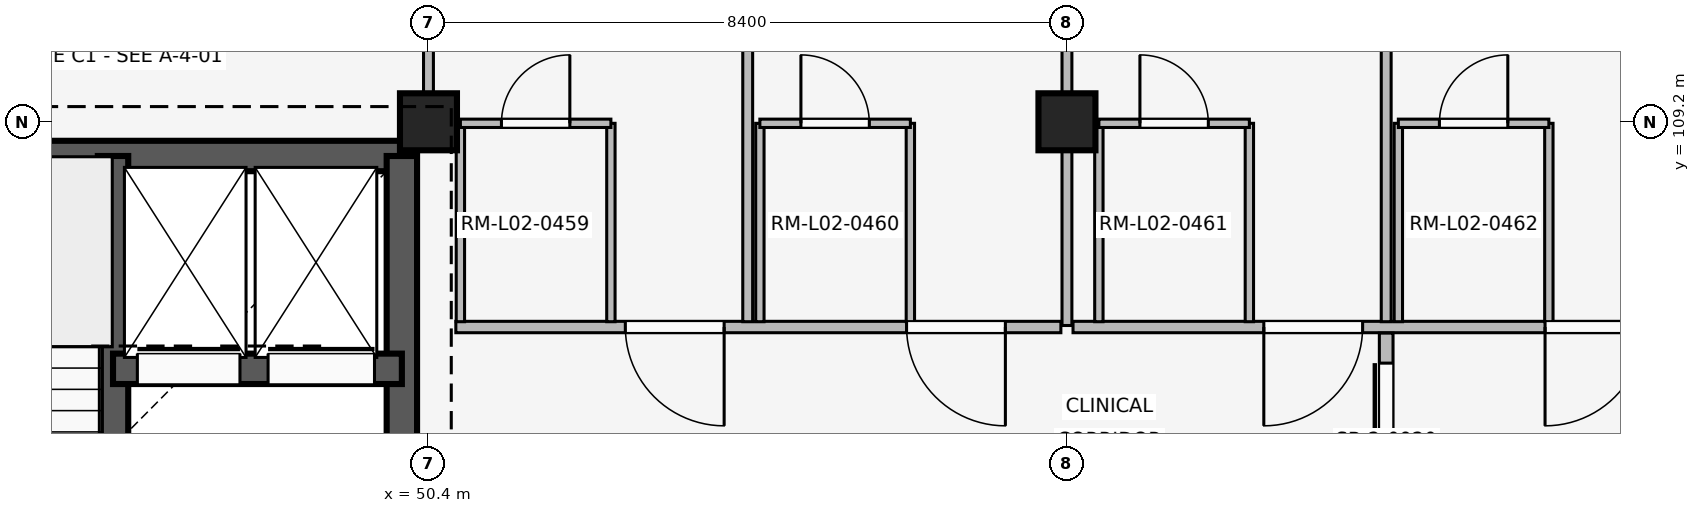
"""IFC4 building model, lengths in metres.
Left out: names, types, materials, properties, quantities, classifications, styles, units other than length and angle.
Written with IfcOpenShell. Run it as: python <this file> out.ifc"""

import sys

from ifc_helpers import new_model, si_unit, direction, frame, frame_2d, origin, origin_2d, place, context, subcontext, project, spatial, rectangle, extrude, element, fill, save


model = new_model("IFC4")
c1 = context("Model", 3, precision=1e-05, world=origin(), true_north=direction((0.0, 1.0)))
c2 = subcontext(c1, "Body", "Model", "MODEL_VIEW")
j1 = project(units=[si_unit("LENGTHUNIT", "METRE"), si_unit("PLANEANGLEUNIT", "RADIAN")], contexts=[c1])
p1 = place(None, origin())
s1 = spatial("IfcSite", under=j1, at=p1, CompositionType="ELEMENT")
p2 = place(p1, origin())
s2 = spatial("IfcBuilding", under=s1, at=p2, CompositionType="ELEMENT")
p3 = place(p2, frame((0.0, 0.0, 8.1)))
s3 = spatial("IfcBuildingStorey", under=s2, at=p3, CompositionType="ELEMENT", Elevation=8.1)
for number, where, z_axis, x_axis in (
    (1, (50.4, 109.2, 0.0), (0.0, 0.0, 1.0), (1.0, 0.0, 0.0)),
    (2, (58.8, 109.2, 0.0), (0.0, 0.0, 1.0), (1.0, 0.0, 0.0)),
):
    element("IfcColumn", number, at=place(p3, frame(where, z_axis=z_axis, x_axis=x_axis)), inside=s3, PredefinedType="COLUMN", context=c2, shape_type="SweptSolid", body=[
        extrude(rectangle(XDim=0.75, YDim=0.75, at=origin_2d()), origin(), (0.0, 0.0, 1.0), 4.8),
    ])
p4 = place(p3, frame((42.55, 108.75, 0.0), z_axis=(0.0, 0.0, 1.0), x_axis=(1.0, 0.0, 0.0)))
e3 = element("IfcWall", 3, at=p4, inside=s3, PredefinedType="SHEAR", context=c2, shape_type="SweptSolid", body=[
    extrude(rectangle(XDim=7.5, YDim=0.4, at=frame_2d((3.75, 0.0))), origin(), (0.0, 0.0, 1.0), 4.52),
])
p5 = place(p3, frame((50.05, 101.2, 0.0), z_axis=(0.0, 0.0, 1.0), x_axis=(0.0, 1.0, 0.0)))
e4 = element("IfcWall", 4, at=p5, inside=s3, PredefinedType="SHEAR", context=c2, shape_type="SweptSolid", body=[
    extrude(rectangle(XDim=7.55, YDim=0.4, at=frame_2d((3.775, 0.0))), origin(), (0.0, 0.0, 1.0), 4.52),
])
p6 = place(p5, frame((2.4, 0.0, 0.0)))
e5 = element("IfcOpeningElement", 5, at=p6, cuts=e4, PredefinedType="OPENING", context=c2, shape_type="SweptSolid", body=[
    extrude(rectangle(XDim=1.2, YDim=2.2, at=frame_2d((0.6, 1.1))), frame((0.0, 0.21, 0.0), z_axis=(0.0, -1.0, 0.0), x_axis=(1.0, 0.0, 0.0)), (0.0, 0.0, 1.0), 0.42),
])
p7 = place(p3, frame((46.25, 101.2, 0.0), z_axis=(0.0, 0.0, 1.0), x_axis=(0.0, 1.0, 0.0)))
e6 = element("IfcWall", 6, at=p7, inside=s3, PredefinedType="SHEAR", context=c2, shape_type="SweptSolid", body=[
    extrude(rectangle(XDim=7.55, YDim=0.4, at=frame_2d((3.775, 0.0))), origin(), (0.0, 0.0, 1.0), 4.52),
])
p8 = place(p7, frame((0.28, 0.0, 0.0)))
e7 = element("IfcOpeningElement", 7, at=p8, cuts=e6, PredefinedType="OPENING", context=c2, shape_type="SweptSolid", body=[
    extrude(rectangle(XDim=1.0, YDim=2.15, at=frame_2d((0.5, 1.075))), frame((0.0, 0.21, 0.0), z_axis=(0.0, -1.0, 0.0), x_axis=(1.0, 0.0, 0.0)), (0.0, 0.0, 1.0), 0.42),
])
p9 = place(p3, frame((46.25, 105.95, 0.0), z_axis=(0.0, 0.0, 1.0), x_axis=(1.0, 0.0, 0.0)))
e8 = element("IfcWall", 8, at=p9, inside=s3, PredefinedType="SHEAR", context=c2, shape_type="SweptSolid", body=[
    extrude(rectangle(XDim=3.8, YDim=0.4, at=frame_2d((1.9, 0.0))), origin(), (0.0, 0.0, 1.0), 4.52),
])
p10 = place(p9, frame((0.32, 0.0, 0.0)))
e9 = element("IfcOpeningElement", 9, at=p10, cuts=e8, PredefinedType="OPENING", context=c2, shape_type="SweptSolid", body=[
    extrude(rectangle(XDim=1.35, YDim=2.25, at=frame_2d((0.675, 1.125))), frame((0.0, 0.21, 0.0), z_axis=(0.0, -1.0, 0.0), x_axis=(1.0, 0.0, 0.0)), (0.0, 0.0, 1.0), 0.42),
])
p11 = place(p9, frame((2.04, 0.0, 0.0)))
e10 = element("IfcOpeningElement", 10, at=p11, cuts=e8, PredefinedType="OPENING", context=c2, shape_type="SweptSolid", body=[
    extrude(rectangle(XDim=1.4, YDim=2.25, at=frame_2d((0.7, 1.125))), frame((0.0, 0.21, 0.0), z_axis=(0.0, -1.0, 0.0), x_axis=(1.0, 0.0, 0.0)), (0.0, 0.0, 1.0), 0.42),
])
p12 = place(p3, frame((50.4, 109.55, 0.0), z_axis=(0.0, 0.0, 1.0), x_axis=(0.0, 1.0, 0.0)))
e11 = element("IfcWall", 11, at=p12, inside=s3, PredefinedType="PARTITIONING", context=c2, shape_type="SweptSolid", body=[
    extrude(rectangle(XDim=7.91, YDim=0.13, at=frame_2d((3.955, 0.0))), origin(), (0.0, 0.0, 1.0), 3.84),
])
p13 = place(p12, frame((3.4, 0.0, 0.0)))
e12 = element("IfcOpeningElement", 12, at=p13, cuts=e11, PredefinedType="OPENING", context=c2, shape_type="SweptSolid", body=[
    extrude(rectangle(XDim=1.05, YDim=2.2, at=frame_2d((0.525, 1.1))), frame((0.0, 0.075, 0.0), z_axis=(0.0, -1.0, 0.0), x_axis=(1.0, 0.0, 0.0)), (0.0, 0.0, 1.0), 0.15),
])
p14 = place(p3, frame((58.72, 106.5, 0.0), z_axis=(0.0, 0.0, 1.0), x_axis=(-1.0, 0.0, 0.0)))
e13 = element("IfcWall", 13, at=p14, inside=s3, PredefinedType="PARTITIONING", context=c2, shape_type="SweptSolid", body=[
    extrude(rectangle(XDim=7.96, YDim=0.15, at=frame_2d((3.98, 0.0))), origin(), (0.0, 0.0, 1.0), 3.84),
])
p15 = place(p14, frame((0.73, 0.0, 0.0)))
e14 = element("IfcOpeningElement", 14, at=p15, cuts=e13, PredefinedType="OPENING", context=c2, shape_type="SweptSolid", body=[
    extrude(rectangle(XDim=1.3, YDim=2.25, at=frame_2d((0.65, 1.125))), frame((0.0, 0.085, 0.0), z_axis=(0.0, -1.0, 0.0), x_axis=(1.0, 0.0, 0.0)), (0.0, 0.0, 1.0), 0.17),
])
p16 = place(p14, frame((4.43, 0.0, 0.0)))
e15 = element("IfcOpeningElement", 15, at=p16, cuts=e13, PredefinedType="OPENING", context=c2, shape_type="SweptSolid", body=[
    extrude(rectangle(XDim=1.3, YDim=2.25, at=frame_2d((0.65, 1.125))), frame((0.0, 0.085, 0.0), z_axis=(0.0, -1.0, 0.0), x_axis=(1.0, 0.0, 0.0)), (0.0, 0.0, 1.0), 0.17),
])
p17 = place(p3, frame((54.6, 106.57, 0.0), z_axis=(0.0, 0.0, 1.0), x_axis=(0.0, 1.0, 0.0)))
e16 = element("IfcWall", 16, at=p17, inside=s3, PredefinedType="PARTITIONING", context=c2, shape_type="SweptSolid", body=[
    extrude(rectangle(XDim=10.93, YDim=0.13, at=frame_2d((5.465, 0.0))), origin(), (0.0, 0.0, 1.0), 3.84),
])
for number, where, z_axis, x_axis in (
    (17, (50.82, 106.57, 0.0), (0.0, 0.0, 1.0), (0.0, 1.0, 0.0)),
    (18, (52.8, 106.57, 0.0), (0.0, 0.0, 1.0), (0.0, 1.0, 0.0)),
):
    element("IfcWall", number, at=place(p3, frame(where, z_axis=z_axis, x_axis=x_axis)), inside=s3, PredefinedType="PARTITIONING", context=c2, shape_type="SweptSolid", body=[
        extrude(rectangle(XDim=2.61, YDim=0.11, at=frame_2d((1.305, 0.0))), origin(), (0.0, 0.0, 1.0), 3.84),
    ])
p18 = place(p3, frame((50.82, 109.18, 0.0), z_axis=(0.0, 0.0, 1.0), x_axis=(1.0, 0.0, 0.0)))
e19 = element("IfcWall", 19, at=p18, inside=s3, PredefinedType="PARTITIONING", context=c2, shape_type="SweptSolid", body=[
    extrude(rectangle(XDim=1.98, YDim=0.11, at=frame_2d((0.99, 0.0))), origin(), (0.0, 0.0, 1.0), 3.84),
])
p19 = place(p18, frame((0.54, 0.0, 0.0)))
e20 = element("IfcOpeningElement", 20, at=p19, cuts=e19, PredefinedType="OPENING", context=c2, shape_type="SweptSolid", body=[
    extrude(rectangle(XDim=0.9, YDim=2.1, at=frame_2d((0.45, 1.05))), frame((0.0, 0.065, 0.0), z_axis=(0.0, -1.0, 0.0), x_axis=(1.0, 0.0, 0.0)), (0.0, 0.0, 1.0), 0.13),
])
for number, where, z_axis, x_axis in (
    (21, (54.76, 106.57, 0.0), (0.0, 0.0, 1.0), (0.0, 1.0, 0.0)),
    (22, (56.74, 106.57, 0.0), (0.0, 0.0, 1.0), (0.0, 1.0, 0.0)),
):
    element("IfcWall", number, at=place(p3, frame(where, z_axis=z_axis, x_axis=x_axis)), inside=s3, PredefinedType="PARTITIONING", context=c2, shape_type="SweptSolid", body=[
        extrude(rectangle(XDim=2.61, YDim=0.11, at=frame_2d((1.305, 0.0))), origin(), (0.0, 0.0, 1.0), 3.84),
    ])
p20 = place(p3, frame((54.76, 109.18, 0.0), z_axis=(0.0, 0.0, 1.0), x_axis=(1.0, 0.0, 0.0)))
e23 = element("IfcWall", 23, at=p20, inside=s3, PredefinedType="PARTITIONING", context=c2, shape_type="SweptSolid", body=[
    extrude(rectangle(XDim=1.98, YDim=0.11, at=frame_2d((0.99, 0.0))), origin(), (0.0, 0.0, 1.0), 3.84),
])
p21 = place(p20, frame((0.54, 0.0, 0.0)))
e24 = element("IfcOpeningElement", 24, at=p21, cuts=e23, PredefinedType="OPENING", context=c2, shape_type="SweptSolid", body=[
    extrude(rectangle(XDim=0.9, YDim=2.1, at=frame_2d((0.45, 1.05))), frame((0.0, 0.065, 0.0), z_axis=(0.0, -1.0, 0.0), x_axis=(1.0, 0.0, 0.0)), (0.0, 0.0, 1.0), 0.13),
])
p22 = place(p3, frame((58.8, 106.52, 0.0), z_axis=(0.0, 0.0, 1.0), x_axis=(0.0, 1.0, 0.0)))
e25 = element("IfcWall", 25, at=p22, inside=s3, PredefinedType="PARTITIONING", context=c2, shape_type="SweptSolid", body=[
    extrude(rectangle(XDim=10.94, YDim=0.13, at=frame_2d((5.47, 0.0))), origin(), (0.0, 0.0, 1.0), 3.84),
])
p23 = place(p3, frame((67.12, 106.5, 0.0), z_axis=(0.0, 0.0, 1.0), x_axis=(-1.0, 0.0, 0.0)))
e26 = element("IfcWall", 26, at=p23, inside=s3, PredefinedType="PARTITIONING", context=c2, shape_type="SweptSolid", body=[
    extrude(rectangle(XDim=8.24, YDim=0.15, at=frame_2d((4.12, 0.0))), origin(), (0.0, 0.0, 1.0), 3.84),
])
p24 = place(p23, frame((0.73, 0.0, 0.0)))
e27 = element("IfcOpeningElement", 27, at=p24, cuts=e26, PredefinedType="OPENING", context=c2, shape_type="SweptSolid", body=[
    extrude(rectangle(XDim=1.3, YDim=2.25, at=frame_2d((0.65, 1.125))), frame((0.0, 0.085, 0.0), z_axis=(0.0, -1.0, 0.0), x_axis=(1.0, 0.0, 0.0)), (0.0, 0.0, 1.0), 0.17),
])
p25 = place(p23, frame((4.43, 0.0, 0.0)))
e28 = element("IfcOpeningElement", 28, at=p25, cuts=e26, PredefinedType="OPENING", context=c2, shape_type="SweptSolid", body=[
    extrude(rectangle(XDim=1.3, YDim=2.25, at=frame_2d((0.65, 1.125))), frame((0.0, 0.085, 0.0), z_axis=(0.0, -1.0, 0.0), x_axis=(1.0, 0.0, 0.0)), (0.0, 0.0, 1.0), 0.17),
])
p26 = place(p3, frame((63.0, 106.57, 0.0), z_axis=(0.0, 0.0, 1.0), x_axis=(0.0, 1.0, 0.0)))
e29 = element("IfcWall", 29, at=p26, inside=s3, PredefinedType="PARTITIONING", context=c2, shape_type="SweptSolid", body=[
    extrude(rectangle(XDim=10.93, YDim=0.13, at=frame_2d((5.465, 0.0))), origin(), (0.0, 0.0, 1.0), 3.84),
])
for number, where, z_axis, x_axis in (
    (30, (59.22, 106.57, 0.0), (0.0, 0.0, 1.0), (0.0, 1.0, 0.0)),
    (31, (61.2, 106.57, 0.0), (0.0, 0.0, 1.0), (0.0, 1.0, 0.0)),
):
    element("IfcWall", number, at=place(p3, frame(where, z_axis=z_axis, x_axis=x_axis)), inside=s3, PredefinedType="PARTITIONING", context=c2, shape_type="SweptSolid", body=[
        extrude(rectangle(XDim=2.61, YDim=0.11, at=frame_2d((1.305, 0.0))), origin(), (0.0, 0.0, 1.0), 3.84),
    ])
p27 = place(p3, frame((59.22, 109.18, 0.0), z_axis=(0.0, 0.0, 1.0), x_axis=(1.0, 0.0, 0.0)))
e32 = element("IfcWall", 32, at=p27, inside=s3, PredefinedType="PARTITIONING", context=c2, shape_type="SweptSolid", body=[
    extrude(rectangle(XDim=1.98, YDim=0.11, at=frame_2d((0.99, 0.0))), origin(), (0.0, 0.0, 1.0), 3.84),
])
p28 = place(p27, frame((0.54, 0.0, 0.0)))
e33 = element("IfcOpeningElement", 33, at=p28, cuts=e32, PredefinedType="OPENING", context=c2, shape_type="SweptSolid", body=[
    extrude(rectangle(XDim=0.9, YDim=2.1, at=frame_2d((0.45, 1.05))), frame((0.0, 0.065, 0.0), z_axis=(0.0, -1.0, 0.0), x_axis=(1.0, 0.0, 0.0)), (0.0, 0.0, 1.0), 0.13),
])
for number, where, z_axis, x_axis in (
    (34, (63.16, 106.57, 0.0), (0.0, 0.0, 1.0), (0.0, 1.0, 0.0)),
    (35, (65.14, 106.57, 0.0), (0.0, 0.0, 1.0), (0.0, 1.0, 0.0)),
):
    element("IfcWall", number, at=place(p3, frame(where, z_axis=z_axis, x_axis=x_axis)), inside=s3, PredefinedType="PARTITIONING", context=c2, shape_type="SweptSolid", body=[
        extrude(rectangle(XDim=2.61, YDim=0.11, at=frame_2d((1.305, 0.0))), origin(), (0.0, 0.0, 1.0), 3.84),
    ])
p29 = place(p3, frame((63.16, 109.18, 0.0), z_axis=(0.0, 0.0, 1.0), x_axis=(1.0, 0.0, 0.0)))
e36 = element("IfcWall", 36, at=p29, inside=s3, PredefinedType="PARTITIONING", context=c2, shape_type="SweptSolid", body=[
    extrude(rectangle(XDim=1.98, YDim=0.11, at=frame_2d((0.99, 0.0))), origin(), (0.0, 0.0, 1.0), 3.84),
])
p30 = place(p29, frame((0.54, 0.0, 0.0)))
e37 = element("IfcOpeningElement", 37, at=p30, cuts=e36, PredefinedType="OPENING", context=c2, shape_type="SweptSolid", body=[
    extrude(rectangle(XDim=0.9, YDim=2.1, at=frame_2d((0.45, 1.05))), frame((0.0, 0.065, 0.0), z_axis=(0.0, -1.0, 0.0), x_axis=(1.0, 0.0, 0.0)), (0.0, 0.0, 1.0), 0.13),
])
p31 = place(p3, frame((63.0, 103.58, 0.0), z_axis=(0.0, 0.0, 1.0), x_axis=(0.0, 1.0, 0.0)))
e38 = element("IfcWall", 38, at=p31, inside=s3, PredefinedType="PARTITIONING", context=c2, shape_type="SweptSolid", body=[
    extrude(rectangle(XDim=2.84, YDim=0.18, at=frame_2d((1.42, 0.0))), origin(), (0.0, 0.0, 1.0), 3.84),
])
p32 = place(p31, frame((0.395, 0.0, 0.0)))
e39 = element("IfcOpeningElement", 39, at=p32, cuts=e38, PredefinedType="OPENING", context=c2, shape_type="SweptSolid", body=[
    extrude(rectangle(XDim=2.05, YDim=2.35, at=frame_2d((1.025, 1.175))), frame((0.0, 0.1, 0.0), z_axis=(0.0, -1.0, 0.0), x_axis=(1.0, 0.0, 0.0)), (0.0, 0.0, 1.0), 0.2),
])
p33 = place(p10, origin())
e40 = element("IfcDoor", 40, at=p33, inside=s3, OperationType="SLIDING_TO_LEFT", PredefinedType="DOOR", context=c2, shape_type="SweptSolid", body=[
    extrude(rectangle(XDim=1.35, YDim=2.25, at=frame_2d((0.675, 1.125))), frame((0.0, 0.025, 0.0), z_axis=(0.0, -1.0, 0.0), x_axis=(1.0, 0.0, 0.0)), (0.0, 0.0, 1.0), 0.05),
])
fill(e9, e40)
p34 = place(p11, origin())
e41 = element("IfcDoor", 41, at=p34, inside=s3, OperationType="SLIDING_TO_LEFT", PredefinedType="DOOR", context=c2, shape_type="SweptSolid", body=[
    extrude(rectangle(XDim=1.4, YDim=2.25, at=frame_2d((0.7, 1.125))), frame((0.0, 0.025, 0.0), z_axis=(0.0, -1.0, 0.0), x_axis=(1.0, 0.0, 0.0)), (0.0, 0.0, 1.0), 0.05),
])
fill(e10, e41)
p35 = place(p15, origin())
e42 = element("IfcDoor", 42, at=p35, inside=s3, OperationType="SINGLE_SWING_LEFT", PredefinedType="DOOR", context=c2, shape_type="SweptSolid", body=[
    extrude(rectangle(XDim=1.3, YDim=2.25, at=frame_2d((0.65, 1.125))), frame((0.0, 0.025, 0.0), z_axis=(0.0, -1.0, 0.0), x_axis=(1.0, 0.0, 0.0)), (0.0, 0.0, 1.0), 0.05),
])
fill(e14, e42)
p36 = place(p16, origin())
e43 = element("IfcDoor", 43, at=p36, inside=s3, OperationType="SINGLE_SWING_LEFT", PredefinedType="DOOR", context=c2, shape_type="SweptSolid", body=[
    extrude(rectangle(XDim=1.3, YDim=2.25, at=frame_2d((0.65, 1.125))), frame((0.0, 0.025, 0.0), z_axis=(0.0, -1.0, 0.0), x_axis=(1.0, 0.0, 0.0)), (0.0, 0.0, 1.0), 0.05),
])
fill(e15, e43)
p37 = place(p19, origin())
e44 = element("IfcDoor", 44, at=p37, inside=s3, OperationType="SINGLE_SWING_RIGHT", PredefinedType="DOOR", context=c2, shape_type="SweptSolid", body=[
    extrude(rectangle(XDim=0.9, YDim=2.1, at=frame_2d((0.45, 1.05))), frame((0.0, 0.025, 0.0), z_axis=(0.0, -1.0, 0.0), x_axis=(1.0, 0.0, 0.0)), (0.0, 0.0, 1.0), 0.05),
])
fill(e20, e44)
p38 = place(p21, origin())
e45 = element("IfcDoor", 45, at=p38, inside=s3, OperationType="SINGLE_SWING_LEFT", PredefinedType="DOOR", context=c2, shape_type="SweptSolid", body=[
    extrude(rectangle(XDim=0.9, YDim=2.1, at=frame_2d((0.45, 1.05))), frame((0.0, 0.025, 0.0), z_axis=(0.0, -1.0, 0.0), x_axis=(1.0, 0.0, 0.0)), (0.0, 0.0, 1.0), 0.05),
])
fill(e24, e45)
p39 = place(p24, origin())
e46 = element("IfcDoor", 46, at=p39, inside=s3, OperationType="SINGLE_SWING_RIGHT", PredefinedType="DOOR", context=c2, shape_type="SweptSolid", body=[
    extrude(rectangle(XDim=1.3, YDim=2.25, at=frame_2d((0.65, 1.125))), frame((0.0, 0.025, 0.0), z_axis=(0.0, -1.0, 0.0), x_axis=(1.0, 0.0, 0.0)), (0.0, 0.0, 1.0), 0.05),
])
fill(e27, e46)
p40 = place(p25, origin())
e47 = element("IfcDoor", 47, at=p40, inside=s3, OperationType="SINGLE_SWING_RIGHT", PredefinedType="DOOR", context=c2, shape_type="SweptSolid", body=[
    extrude(rectangle(XDim=1.3, YDim=2.25, at=frame_2d((0.65, 1.125))), frame((0.0, 0.025, 0.0), z_axis=(0.0, -1.0, 0.0), x_axis=(1.0, 0.0, 0.0)), (0.0, 0.0, 1.0), 0.05),
])
fill(e28, e47)
p41 = place(p28, origin())
e48 = element("IfcDoor", 48, at=p41, inside=s3, OperationType="SINGLE_SWING_LEFT", PredefinedType="DOOR", context=c2, shape_type="SweptSolid", body=[
    extrude(rectangle(XDim=0.9, YDim=2.1, at=frame_2d((0.45, 1.05))), frame((0.0, 0.025, 0.0), z_axis=(0.0, -1.0, 0.0), x_axis=(1.0, 0.0, 0.0)), (0.0, 0.0, 1.0), 0.05),
])
fill(e33, e48)
p42 = place(p30, origin())
e49 = element("IfcDoor", 49, at=p42, inside=s3, OperationType="SINGLE_SWING_RIGHT", PredefinedType="DOOR", context=c2, shape_type="SweptSolid", body=[
    extrude(rectangle(XDim=0.9, YDim=2.1, at=frame_2d((0.45, 1.05))), frame((0.0, 0.025, 0.0), z_axis=(0.0, -1.0, 0.0), x_axis=(1.0, 0.0, 0.0)), (0.0, 0.0, 1.0), 0.05),
])
fill(e37, e49)
p43 = place(p32, origin())
e50 = element("IfcDoor", 50, at=p43, inside=s3, OperationType="SLIDING_TO_LEFT", PredefinedType="DOOR", context=c2, shape_type="SweptSolid", body=[
    extrude(rectangle(XDim=2.05, YDim=2.35, at=frame_2d((1.025, 1.175))), frame((0.0, 0.025, 0.0), z_axis=(0.0, -1.0, 0.0), x_axis=(1.0, 0.0, 0.0)), (0.0, 0.0, 1.0), 0.05),
])
fill(e39, e50)
save(model, sys.argv[1])
